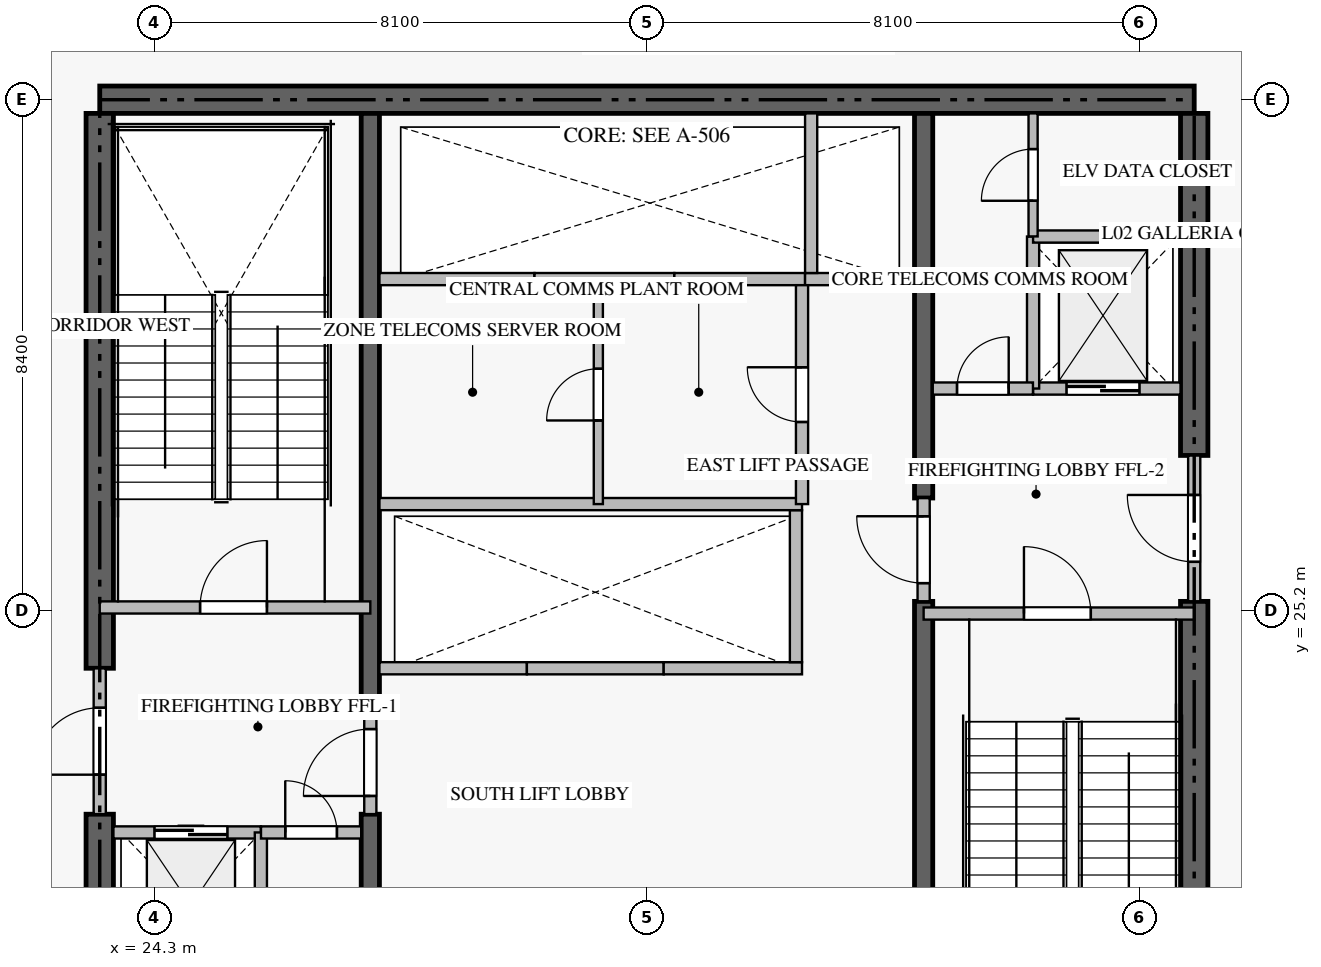
"""IFC4 building model, lengths in metres.
Left out: names, types, materials, properties, quantities, classifications, styles, units other than length and angle.
Written with IfcOpenShell. Run it as: python <this file> out.ifc"""

import sys

from ifc_helpers import new_model, si_unit, direction, frame, frame_2d, origin, place, context, subcontext, project, spatial, rectangle, extrude, source, transform, mapped, element, fill, save


model = new_model("IFC4")
c1 = context("Model", 3, precision=1e-05, world=origin(), true_north=direction((0.0, 1.0)))
c2 = subcontext(c1, "Body", "Model", "MODEL_VIEW")
j1 = project(units=[si_unit("LENGTHUNIT", "METRE"), si_unit("PLANEANGLEUNIT", "RADIAN")], contexts=[c1])
p1 = place(None, origin())
s1 = spatial("IfcSite", under=j1, at=p1, CompositionType="ELEMENT")
p2 = place(p1, origin())
s2 = spatial("IfcBuilding", under=s1, at=p2, CompositionType="ELEMENT")
p3 = place(p2, frame((0.0, 0.0, 10.5)))
s3 = spatial("IfcBuildingStorey", under=s2, at=p3, CompositionType="ELEMENT", Elevation=10.5)
p4 = place(p3, frame((41.4, 33.6, -0.38), z_axis=(0.0, 0.0, 1.0), x_axis=(-1.0, 0.0, 0.0)))
e1 = element("IfcWall", 1, at=p4, inside=s3, PredefinedType="SHEAR", context=c2, shape_type="SweptSolid", body=[
    extrude(rectangle(XDim=18.0, YDim=0.45, at=frame_2d((9.0, 0.0))), origin(), (0.0, 0.0, 1.0), 4.798),
])
p5 = place(p3, frame((23.4, 17.025, -0.38), z_axis=(0.0, 0.0, 1.0), x_axis=(0.0, 1.0, 0.0)))
e2 = element("IfcWall", 2, at=p5, inside=s3, PredefinedType="SHEAR", context=c2, shape_type="SweptSolid", body=[
    extrude(rectangle(XDim=4.825, YDim=0.45, at=frame_2d((2.413, 0.0))), origin(), (0.0, 0.0, 1.0), 4.798),
])
p6 = place(p3, frame((23.4, 24.25, -0.38), z_axis=(0.0, 0.0, 1.0), x_axis=(0.0, 1.0, 0.0)))
e3 = element("IfcWall", 3, at=p6, inside=s3, PredefinedType="SHEAR", context=c2, shape_type="SweptSolid", body=[
    extrude(rectangle(XDim=9.125, YDim=0.45, at=frame_2d((4.562, 0.0))), origin(), (0.0, 0.0, 1.0), 4.798),
])
p7 = place(p3, frame((41.4, 17.025, -0.38), z_axis=(0.0, 0.0, 1.0), x_axis=(0.0, 1.0, 0.0)))
e4 = element("IfcWall", 4, at=p7, inside=s3, PredefinedType="SHEAR", context=c2, shape_type="SweptSolid", body=[
    extrude(rectangle(XDim=8.325, YDim=0.45, at=frame_2d((4.163, 0.0))), origin(), (0.0, 0.0, 1.0), 4.798),
])
p8 = place(p3, frame((41.4, 27.75, -0.38), z_axis=(0.0, 0.0, 1.0), x_axis=(0.0, 1.0, 0.0)))
e5 = element("IfcWall", 5, at=p8, inside=s3, PredefinedType="SHEAR", context=c2, shape_type="SweptSolid", body=[
    extrude(rectangle(XDim=5.625, YDim=0.45, at=frame_2d((2.812, 0.0))), origin(), (0.0, 0.0, 1.0), 4.798),
])
p9 = place(p3, frame((27.85, 17.025, -0.38), z_axis=(0.0, 0.0, 1.0), x_axis=(0.0, 1.0, 0.0)))
e6 = element("IfcWall", 6, at=p9, inside=s3, PredefinedType="SHEAR", context=c2, shape_type="SweptSolid", body=[
    extrude(rectangle(XDim=4.825, YDim=0.3, at=frame_2d((2.413, 0.0))), origin(), (0.0, 0.0, 1.0), 4.798),
])
p10 = place(p3, frame((27.85, 23.55, -0.38), z_axis=(0.0, 0.0, 1.0), x_axis=(0.0, 1.0, 0.0)))
e7 = element("IfcWall", 7, at=p10, inside=s3, PredefinedType="SHEAR", context=c2, shape_type="SweptSolid", body=[
    extrude(rectangle(XDim=9.825, YDim=0.3, at=frame_2d((4.913, 0.0))), origin(), (0.0, 0.0, 1.0), 4.798),
])
p11 = place(p3, frame((36.95, 17.025, -0.38), z_axis=(0.0, 0.0, 1.0), x_axis=(0.0, 1.0, 0.0)))
e8 = element("IfcWall", 8, at=p11, inside=s3, PredefinedType="SHEAR", context=c2, shape_type="SweptSolid", body=[
    extrude(rectangle(XDim=8.325, YDim=0.3, at=frame_2d((4.163, 0.0))), origin(), (0.0, 0.0, 1.0), 4.798),
])
p12 = place(p3, frame((36.95, 27.05, -0.38), z_axis=(0.0, 0.0, 1.0), x_axis=(0.0, 1.0, 0.0)))
e9 = element("IfcWall", 9, at=p12, inside=s3, PredefinedType="SHEAR", context=c2, shape_type="SweptSolid", body=[
    extrude(rectangle(XDim=6.325, YDim=0.3, at=frame_2d((3.163, 0.0))), origin(), (0.0, 0.0, 1.0), 4.798),
])
p13 = place(p3, frame((23.4, 25.25, 0.0), z_axis=(0.0, 0.0, 1.0), x_axis=(1.0, 0.0, 0.0)))
e10 = element("IfcWall", 10, at=p13, inside=s3, PredefinedType="STANDARD", context=c2, shape_type="SweptSolid", body=[
    extrude(rectangle(XDim=4.45, YDim=0.2, at=frame_2d((2.225, 0.0))), origin(), (0.0, 0.0, 1.0), 4.42),
])
p14 = place(p13, frame((1.65, 0.0, 0.0)))
e11 = element("IfcOpeningElement", 11, at=p14, cuts=e10, PredefinedType="OPENING", context=c2, shape_type="SweptSolid", body=[
    extrude(rectangle(XDim=1.1, YDim=2.15, at=frame_2d((0.55, 1.075))), frame((0.0, 0.11, 0.0), z_axis=(0.0, -1.0, 0.0), x_axis=(1.0, 0.0, 0.0)), (0.0, 0.0, 1.0), 0.22),
])
p15 = place(p3, frame((36.95, 25.15, 0.0), z_axis=(0.0, 0.0, 1.0), x_axis=(1.0, 0.0, 0.0)))
e12 = element("IfcWall", 12, at=p15, inside=s3, PredefinedType="STANDARD", context=c2, shape_type="SweptSolid", body=[
    extrude(rectangle(XDim=4.45, YDim=0.2, at=frame_2d((2.225, 0.0))), origin(), (0.0, 0.0, 1.0), 4.42),
])
p16 = place(p15, frame((1.65, 0.0, 0.0)))
e13 = element("IfcOpeningElement", 13, at=p16, cuts=e12, PredefinedType="OPENING", context=c2, shape_type="SweptSolid", body=[
    extrude(rectangle(XDim=1.1, YDim=2.15, at=frame_2d((0.55, 1.075))), frame((0.0, 0.11, 0.0), z_axis=(0.0, -1.0, 0.0), x_axis=(1.0, 0.0, 0.0)), (0.0, 0.0, 1.0), 0.22),
])
p17 = place(p3, frame((23.625, 21.55, 0.0), z_axis=(0.0, 0.0, 1.0), x_axis=(1.0, 0.0, 0.0)))
e14 = element("IfcWall", 14, at=p17, inside=s3, PredefinedType="STANDARD", context=c2, shape_type="SweptSolid", body=[
    extrude(rectangle(XDim=2.425, YDim=0.2, at=frame_2d((1.212, 0.0))), origin(), (0.0, 0.0, 1.0), 4.42),
])
p18 = place(p17, frame((0.675, 0.0, 0.0)))
e15 = element("IfcOpeningElement", 15, at=p18, cuts=e14, PredefinedType="OPENING", context=c2, shape_type="SweptSolid", body=[
    extrude(rectangle(XDim=1.2, YDim=2.2, at=frame_2d((0.6, 1.1))), frame((0.0, 0.11, 0.0), z_axis=(0.0, -1.0, 0.0), x_axis=(1.0, 0.0, 0.0)), (0.0, 0.0, 1.0), 0.22),
])
p19 = place(p3, frame((38.75, 28.85, 0.0), z_axis=(0.0, 0.0, 1.0), x_axis=(1.0, 0.0, 0.0)))
e16 = element("IfcWall", 16, at=p19, inside=s3, PredefinedType="STANDARD", context=c2, shape_type="SweptSolid", body=[
    extrude(rectangle(XDim=2.425, YDim=0.2, at=frame_2d((1.212, 0.0))), origin(), (0.0, 0.0, 1.0), 4.42),
])
p20 = place(p19, frame((0.55, 0.0, 0.0)))
e17 = element("IfcOpeningElement", 17, at=p20, cuts=e16, PredefinedType="OPENING", context=c2, shape_type="SweptSolid", body=[
    extrude(rectangle(XDim=1.2, YDim=2.2, at=frame_2d((0.6, 1.1))), frame((0.0, 0.11, 0.0), z_axis=(0.0, -1.0, 0.0), x_axis=(1.0, 0.0, 0.0)), (0.0, 0.0, 1.0), 0.22),
])
p21 = place(p3, frame((28.0, 24.25, 0.0), z_axis=(0.0, 0.0, 1.0), x_axis=(1.0, 0.0, 0.0)))
e18 = element("IfcWall", 18, at=p21, inside=s3, PredefinedType="STANDARD", context=c2, shape_type="SweptSolid", body=[
    extrude(rectangle(XDim=2.425, YDim=0.2, at=frame_2d((1.212, 0.0))), origin(), (0.0, 0.0, 1.0), 4.42),
])
p22 = place(p3, frame((30.425, 24.25, 0.0), z_axis=(0.0, 0.0, 1.0), x_axis=(1.0, 0.0, 0.0)))
e19 = element("IfcWall", 19, at=p22, inside=s3, PredefinedType="STANDARD", context=c2, shape_type="SweptSolid", body=[
    extrude(rectangle(XDim=2.25, YDim=0.2, at=frame_2d((1.125, 0.0))), origin(), (0.0, 0.0, 1.0), 4.42),
])
p23 = place(p3, frame((32.675, 24.25, 0.0), z_axis=(0.0, 0.0, 1.0), x_axis=(1.0, 0.0, 0.0)))
e20 = element("IfcWall", 20, at=p23, inside=s3, PredefinedType="STANDARD", context=c2, shape_type="SweptSolid", body=[
    extrude(rectangle(XDim=2.275, YDim=0.2, at=frame_2d((1.137, 0.0))), origin(), (0.0, 0.0, 1.0), 4.42),
])
p24 = place(p3, frame((34.85, 24.35, 0.0), z_axis=(0.0, 0.0, 1.0), x_axis=(0.0, 1.0, 0.0)))
e21 = element("IfcWall", 21, at=p24, inside=s3, PredefinedType="STANDARD", context=c2, shape_type="SweptSolid", body=[
    extrude(rectangle(XDim=2.5, YDim=0.2, at=frame_2d((1.25, 0.0))), origin(), (0.0, 0.0, 1.0), 4.42),
])
p25 = place(p3, frame((28.0, 30.65, 0.0), z_axis=(0.0, 0.0, 1.0), x_axis=(1.0, 0.0, 0.0)))
e22 = element("IfcWall", 22, at=p25, inside=s3, PredefinedType="STANDARD", context=c2, shape_type="SweptSolid", body=[
    extrude(rectangle(XDim=2.55, YDim=0.2, at=frame_2d((1.275, 0.0))), origin(), (0.0, 0.0, 1.0), 4.42),
])
p26 = place(p3, frame((30.55, 30.65, 0.0), z_axis=(0.0, 0.0, 1.0), x_axis=(1.0, 0.0, 0.0)))
e23 = element("IfcWall", 23, at=p26, inside=s3, PredefinedType="STANDARD", context=c2, shape_type="SweptSolid", body=[
    extrude(rectangle(XDim=2.3, YDim=0.2, at=frame_2d((1.15, 0.0))), origin(), (0.0, 0.0, 1.0), 4.42),
])
p27 = place(p3, frame((32.85, 30.65, 0.0), z_axis=(0.0, 0.0, 1.0), x_axis=(1.0, 0.0, 0.0)))
e24 = element("IfcWall", 24, at=p27, inside=s3, PredefinedType="STANDARD", context=c2, shape_type="SweptSolid", body=[
    extrude(rectangle(XDim=2.15, YDim=0.2, at=frame_2d((1.075, 0.0))), origin(), (0.0, 0.0, 1.0), 4.42),
])
p28 = place(p3, frame((35.0, 30.65, 0.0), z_axis=(0.0, 0.0, 1.0), x_axis=(1.0, 0.0, 0.0)))
e25 = element("IfcWall", 25, at=p28, inside=s3, PredefinedType="STANDARD", context=c2, shape_type="SweptSolid", body=[
    extrude(rectangle(XDim=1.8, YDim=0.2, at=frame_2d((0.9, 0.0))), origin(), (0.0, 0.0, 1.0), 4.42),
])
p29 = place(p3, frame((35.1, 30.75, 0.0), z_axis=(0.0, 0.0, 1.0), x_axis=(0.0, 1.0, 0.0)))
e26 = element("IfcWall", 26, at=p29, inside=s3, PredefinedType="STANDARD", context=c2, shape_type="SweptSolid", body=[
    extrude(rectangle(XDim=2.625, YDim=0.2, at=frame_2d((1.312, 0.0))), origin(), (0.0, 0.0, 1.0), 4.42),
])
p30 = place(p3, frame((26.05, 19.05, 0.0), z_axis=(0.0, 0.0, 1.0), x_axis=(0.0, 1.0, 0.0)))
e27 = element("IfcWall", 27, at=p30, inside=s3, PredefinedType="STANDARD", context=c2, shape_type="SweptSolid", body=[
    extrude(rectangle(XDim=2.5, YDim=0.2, at=frame_2d((1.25, 0.0))), origin(), (0.0, 0.0, 1.0), 4.42),
])
p31 = place(p3, frame((26.052, 21.55, 0.0), z_axis=(0.0, 0.0, 1.0), x_axis=(1.0, 0.0, 0.0)))
e28 = element("IfcWall", 28, at=p31, inside=s3, PredefinedType="STANDARD", context=c2, shape_type="SweptSolid", body=[
    extrude(rectangle(XDim=1.648, YDim=0.2, at=frame_2d((0.824, 0.0))), origin(), (0.0, 0.0, 1.0), 4.42),
])
p32 = place(p31, frame((0.399, 0.0, 0.0)))
e29 = element("IfcOpeningElement", 29, at=p32, cuts=e28, PredefinedType="OPENING", context=c2, shape_type="SweptSolid", body=[
    extrude(rectangle(XDim=0.85, YDim=2.1, at=frame_2d((0.425, 1.05))), frame((0.0, 0.11, 0.0), z_axis=(0.0, -1.0, 0.0), x_axis=(1.0, 0.0, 0.0)), (0.0, 0.0, 1.0), 0.22),
])
p33 = place(p3, frame((38.75, 28.85, 0.0), z_axis=(0.0, 0.0, 1.0), x_axis=(0.0, 1.0, 0.0)))
e30 = element("IfcWall", 30, at=p33, inside=s3, PredefinedType="STANDARD", context=c2, shape_type="SweptSolid", body=[
    extrude(rectangle(XDim=2.5, YDim=0.2, at=frame_2d((1.25, 0.0))), origin(), (0.0, 0.0, 1.0), 4.42),
])
p34 = place(p3, frame((38.75, 31.35, 0.0), z_axis=(0.0, 0.0, 1.0), x_axis=(1.0, 0.0, 0.0)))
e31 = element("IfcWall", 31, at=p34, inside=s3, PredefinedType="STANDARD", context=c2, shape_type="SweptSolid", body=[
    extrude(rectangle(XDim=2.425, YDim=0.2, at=frame_2d((1.212, 0.0))), origin(), (0.0, 0.0, 1.0), 4.42),
])
p35 = place(p3, frame((37.1, 28.85, 0.0), z_axis=(0.0, 0.0, 1.0), x_axis=(1.0, 0.0, 0.0)))
e32 = element("IfcWall", 32, at=p35, inside=s3, PredefinedType="STANDARD", context=c2, shape_type="SweptSolid", body=[
    extrude(rectangle(XDim=1.648, YDim=0.2, at=frame_2d((0.824, 0.0))), origin(), (0.0, 0.0, 1.0), 4.42),
])
p36 = place(p35, frame((0.399, 0.0, 0.0)))
e33 = element("IfcOpeningElement", 33, at=p36, cuts=e32, PredefinedType="OPENING", context=c2, shape_type="SweptSolid", body=[
    extrude(rectangle(XDim=0.85, YDim=2.1, at=frame_2d((0.425, 1.05))), frame((0.0, 0.11, 0.0), z_axis=(0.0, -1.0, 0.0), x_axis=(1.0, 0.0, 0.0)), (0.0, 0.0, 1.0), 0.22),
])
p37 = place(p3, frame((23.4, 21.852, 0.0), z_axis=(0.0, 0.0, 1.0), x_axis=(0.0, 1.0, 0.0)))
e34 = element("IfcWall", 34, at=p37, inside=s3, PredefinedType="STANDARD", context=c2, shape_type="SweptSolid", body=[
    extrude(rectangle(XDim=2.396, YDim=0.2, at=frame_2d((1.198, 0.0))), origin(), (0.0, 0.0, 1.0), 4.42),
])
p38 = place(p37, frame((0.648, 0.0, 0.0)))
e35 = element("IfcOpeningElement", 35, at=p38, cuts=e34, PredefinedType="OPENING", context=c2, shape_type="SweptSolid", body=[
    extrude(rectangle(XDim=1.1, YDim=2.15, at=frame_2d((0.55, 1.075))), frame((0.0, 0.11, 0.0), z_axis=(0.0, -1.0, 0.0), x_axis=(1.0, 0.0, 0.0)), (0.0, 0.0, 1.0), 0.22),
])
p39 = place(p3, frame((41.4, 25.352, 0.0), z_axis=(0.0, 0.0, 1.0), x_axis=(0.0, 1.0, 0.0)))
e36 = element("IfcWall", 36, at=p39, inside=s3, PredefinedType="STANDARD", context=c2, shape_type="SweptSolid", body=[
    extrude(rectangle(XDim=2.396, YDim=0.2, at=frame_2d((1.198, 0.0))), origin(), (0.0, 0.0, 1.0), 4.42),
])
p40 = place(p39, frame((0.648, 0.0, 0.0)))
e37 = element("IfcOpeningElement", 37, at=p40, cuts=e36, PredefinedType="OPENING", context=c2, shape_type="SweptSolid", body=[
    extrude(rectangle(XDim=1.1, YDim=2.15, at=frame_2d((0.55, 1.075))), frame((0.0, 0.11, 0.0), z_axis=(0.0, -1.0, 0.0), x_axis=(1.0, 0.0, 0.0)), (0.0, 0.0, 1.0), 0.22),
])
p41 = place(p3, frame((27.85, 21.852, 0.0), z_axis=(0.0, 0.0, 1.0), x_axis=(0.0, 1.0, 0.0)))
e38 = element("IfcWall", 38, at=p41, inside=s3, PredefinedType="STANDARD", context=c2, shape_type="SweptSolid", body=[
    extrude(rectangle(XDim=1.696, YDim=0.2, at=frame_2d((0.848, 0.0))), origin(), (0.0, 0.0, 1.0), 4.42),
])
p42 = place(p41, frame((0.298, 0.0, 0.0)))
e39 = element("IfcOpeningElement", 39, at=p42, cuts=e38, PredefinedType="OPENING", context=c2, shape_type="SweptSolid", body=[
    extrude(rectangle(XDim=1.1, YDim=2.15, at=frame_2d((0.55, 1.075))), frame((0.0, 0.11, 0.0), z_axis=(0.0, -1.0, 0.0), x_axis=(1.0, 0.0, 0.0)), (0.0, 0.0, 1.0), 0.22),
])
p43 = place(p3, frame((36.95, 25.352, 0.0), z_axis=(0.0, 0.0, 1.0), x_axis=(0.0, 1.0, 0.0)))
e40 = element("IfcWall", 40, at=p43, inside=s3, PredefinedType="STANDARD", context=c2, shape_type="SweptSolid", body=[
    extrude(rectangle(XDim=1.696, YDim=0.2, at=frame_2d((0.848, 0.0))), origin(), (0.0, 0.0, 1.0), 4.42),
])
p44 = place(p43, frame((0.298, 0.0, 0.0)))
e41 = element("IfcOpeningElement", 41, at=p44, cuts=e40, PredefinedType="OPENING", context=c2, shape_type="SweptSolid", body=[
    extrude(rectangle(XDim=1.1, YDim=2.15, at=frame_2d((0.55, 1.075))), frame((0.0, 0.11, 0.0), z_axis=(0.0, -1.0, 0.0), x_axis=(1.0, 0.0, 0.0)), (0.0, 0.0, 1.0), 0.22),
])
p45 = place(p3, frame((28.0, 26.95, 0.0), z_axis=(0.0, 0.0, 1.0), x_axis=(1.0, 0.0, 0.0)))
e42 = element("IfcWall", 42, at=p45, inside=s3, PredefinedType="STANDARD", context=c2, shape_type="SweptSolid", body=[
    extrude(rectangle(XDim=6.95, YDim=0.2, at=frame_2d((3.475, 0.0))), origin(), (0.0, 0.0, 1.0), 4.42),
])
p46 = place(p3, frame((38.75, 31.352, 0.0), z_axis=(0.0, 0.0, 1.0), x_axis=(0.0, 1.0, 0.0)))
e43 = element("IfcWall", 43, at=p46, inside=s3, PredefinedType="PARTITIONING", context=c2, shape_type="SweptSolid", body=[
    extrude(rectangle(XDim=2.023, YDim=0.15, at=frame_2d((1.011, 0.0))), origin(), (0.0, 0.0, 1.0), 4.42),
])
p47 = place(p46, frame((0.586, 0.0, 0.0)))
e44 = element("IfcOpeningElement", 44, at=p47, cuts=e43, PredefinedType="OPENING", context=c2, shape_type="SweptSolid", body=[
    extrude(rectangle(XDim=0.85, YDim=2.1, at=frame_2d((0.425, 1.05))), frame((0.0, 0.085, 0.0), z_axis=(0.0, -1.0, 0.0), x_axis=(1.0, 0.0, 0.0)), (0.0, 0.0, 1.0), 0.17),
])
p48 = place(p3, frame((34.95, 26.95, 0.0), z_axis=(0.0, 0.0, 1.0), x_axis=(0.0, 1.0, 0.0)))
e45 = element("IfcWall", 45, at=p48, inside=s3, PredefinedType="STANDARD", context=c2, shape_type="SweptSolid", body=[
    extrude(rectangle(XDim=3.6, YDim=0.2, at=frame_2d((1.8, 0.0))), origin(), (0.0, 0.0, 1.0), 4.42),
])
p49 = place(p48, frame((1.35, 0.0, 0.0)))
e46 = element("IfcOpeningElement", 46, at=p49, cuts=e45, PredefinedType="OPENING", context=c2, shape_type="SweptSolid", body=[
    extrude(rectangle(XDim=0.9, YDim=2.1, at=frame_2d((0.45, 1.05))), frame((0.0, 0.11, 0.0), z_axis=(0.0, -1.0, 0.0), x_axis=(1.0, 0.0, 0.0)), (0.0, 0.0, 1.0), 0.22),
])
p50 = place(p3, frame((31.6, 26.95, 0.0), z_axis=(0.0, 0.0, 1.0), x_axis=(0.0, 1.0, 0.0)))
e47 = element("IfcWall", 47, at=p50, inside=s3, PredefinedType="PARTITIONING", context=c2, shape_type="SweptSolid", body=[
    extrude(rectangle(XDim=3.6, YDim=0.15, at=frame_2d((1.8, 0.0))), origin(), (0.0, 0.0, 1.0), 4.42),
])
p51 = place(p50, frame((1.375, 0.0, 0.0)))
e48 = element("IfcOpeningElement", 48, at=p51, cuts=e47, PredefinedType="OPENING", context=c2, shape_type="SweptSolid", body=[
    extrude(rectangle(XDim=0.85, YDim=2.1, at=frame_2d((0.425, 1.05))), frame((0.0, 0.085, 0.0), z_axis=(0.0, -1.0, 0.0), x_axis=(1.0, 0.0, 0.0)), (0.0, 0.0, 1.0), 0.17),
])
m1 = source(origin(), c2, "Body", "SweptSolid", [
    extrude(rectangle(XDim=1.1, YDim=2.15, at=frame_2d((0.55, 1.075))), frame((0.0, 0.025, 0.0), z_axis=(0.0, -1.0, 0.0), x_axis=(1.0, 0.0, 0.0)), (0.0, 0.0, 1.0), 0.05),
])
p52 = place(p14, origin())
e49 = element("IfcDoor", 49, at=p52, inside=s3, OperationType="SINGLE_SWING_RIGHT", PredefinedType="DOOR", context=c2, shape_type="MappedRepresentation", body=[
    mapped(m1, transform((0.0, 0.0, 0.0), scale=1.0)),
])
fill(e11, e49)
p53 = place(p16, origin())
e50 = element("IfcDoor", 50, at=p53, inside=s3, OperationType="SINGLE_SWING_LEFT", PredefinedType="DOOR", context=c2, shape_type="MappedRepresentation", body=[
    mapped(m1, transform((0.0, 0.0, 0.0), scale=1.0)),
])
fill(e13, e50)
m2 = source(origin(), c2, "Body", "SweptSolid", [
    extrude(rectangle(XDim=1.2, YDim=2.2, at=frame_2d((0.6, 1.1))), frame((0.0, 0.025, 0.0), z_axis=(0.0, -1.0, 0.0), x_axis=(1.0, 0.0, 0.0)), (0.0, 0.0, 1.0), 0.05),
])
p54 = place(p18, origin())
e51 = element("IfcDoor", 51, at=p54, inside=s3, OperationType="DOUBLE_DOOR_SLIDING", PredefinedType="DOOR", context=c2, shape_type="MappedRepresentation", body=[
    mapped(m2, transform((0.0, 0.0, 0.0), scale=1.0)),
])
fill(e15, e51)
p55 = place(p20, origin())
e52 = element("IfcDoor", 52, at=p55, inside=s3, OperationType="DOUBLE_DOOR_SLIDING", PredefinedType="DOOR", context=c2, shape_type="MappedRepresentation", body=[
    mapped(m2, transform((0.0, 0.0, 0.0), scale=1.0)),
])
fill(e17, e52)
m3 = source(origin(), c2, "Body", "SweptSolid", [
    extrude(rectangle(XDim=0.85, YDim=2.1, at=frame_2d((0.425, 1.05))), frame((0.0, 0.025, 0.0), z_axis=(0.0, -1.0, 0.0), x_axis=(1.0, 0.0, 0.0)), (0.0, 0.0, 1.0), 0.05),
])
p56 = place(p32, origin())
e53 = element("IfcDoor", 53, at=p56, inside=s3, OperationType="SINGLE_SWING_LEFT", PredefinedType="DOOR", context=c2, shape_type="MappedRepresentation", body=[
    mapped(m3, transform((0.0, 0.0, 0.0), scale=1.0)),
])
fill(e29, e53)
p57 = place(p36, origin())
e54 = element("IfcDoor", 54, at=p57, inside=s3, OperationType="SINGLE_SWING_RIGHT", PredefinedType="DOOR", context=c2, shape_type="MappedRepresentation", body=[
    mapped(m3, transform((0.0, 0.0, 0.0), scale=1.0)),
])
fill(e33, e54)
p58 = place(p38, origin())
e55 = element("IfcDoor", 55, at=p58, inside=s3, OperationType="SINGLE_SWING_LEFT", PredefinedType="DOOR", context=c2, shape_type="MappedRepresentation", body=[
    mapped(m1, transform((0.0, 0.0, 0.0), scale=1.0)),
])
fill(e35, e55)
p59 = place(p40, origin())
e56 = element("IfcDoor", 56, at=p59, inside=s3, OperationType="SINGLE_SWING_RIGHT", PredefinedType="DOOR", context=c2, shape_type="MappedRepresentation", body=[
    mapped(m1, transform((0.0, 0.0, 0.0), scale=1.0)),
])
fill(e37, e56)
p60 = place(p42, origin())
e57 = element("IfcDoor", 57, at=p60, inside=s3, OperationType="SINGLE_SWING_LEFT", PredefinedType="DOOR", context=c2, shape_type="MappedRepresentation", body=[
    mapped(m1, transform((0.0, 0.0, 0.0), scale=1.0)),
])
fill(e39, e57)
p61 = place(p44, origin())
e58 = element("IfcDoor", 58, at=p61, inside=s3, OperationType="SINGLE_SWING_RIGHT", PredefinedType="DOOR", context=c2, shape_type="MappedRepresentation", body=[
    mapped(m1, transform((0.0, 0.0, 0.0), scale=1.0)),
])
fill(e41, e58)
p62 = place(p47, origin())
e59 = element("IfcDoor", 59, at=p62, inside=s3, OperationType="SINGLE_SWING_LEFT", PredefinedType="DOOR", context=c2, shape_type="MappedRepresentation", body=[
    mapped(m3, transform((0.0, 0.0, 0.0), scale=1.0)),
])
fill(e44, e59)
m4 = source(origin(), c2, "Body", "SweptSolid", [
    extrude(rectangle(XDim=0.9, YDim=2.1, at=frame_2d((0.45, 1.05))), frame((0.0, 0.025, 0.0), z_axis=(0.0, -1.0, 0.0), x_axis=(1.0, 0.0, 0.0)), (0.0, 0.0, 1.0), 0.05),
])
p63 = place(p49, origin())
e60 = element("IfcDoor", 60, at=p63, inside=s3, OperationType="SINGLE_SWING_RIGHT", PredefinedType="DOOR", context=c2, shape_type="MappedRepresentation", body=[
    mapped(m4, transform((0.0, 0.0, 0.0), scale=1.0)),
])
fill(e46, e60)
p64 = place(p51, origin())
e61 = element("IfcDoor", 61, at=p64, inside=s3, OperationType="SINGLE_SWING_LEFT", PredefinedType="DOOR", context=c2, shape_type="MappedRepresentation", body=[
    mapped(m3, transform((0.0, 0.0, 0.0), scale=1.0)),
])
fill(e48, e61)
save(model, sys.argv[1])
